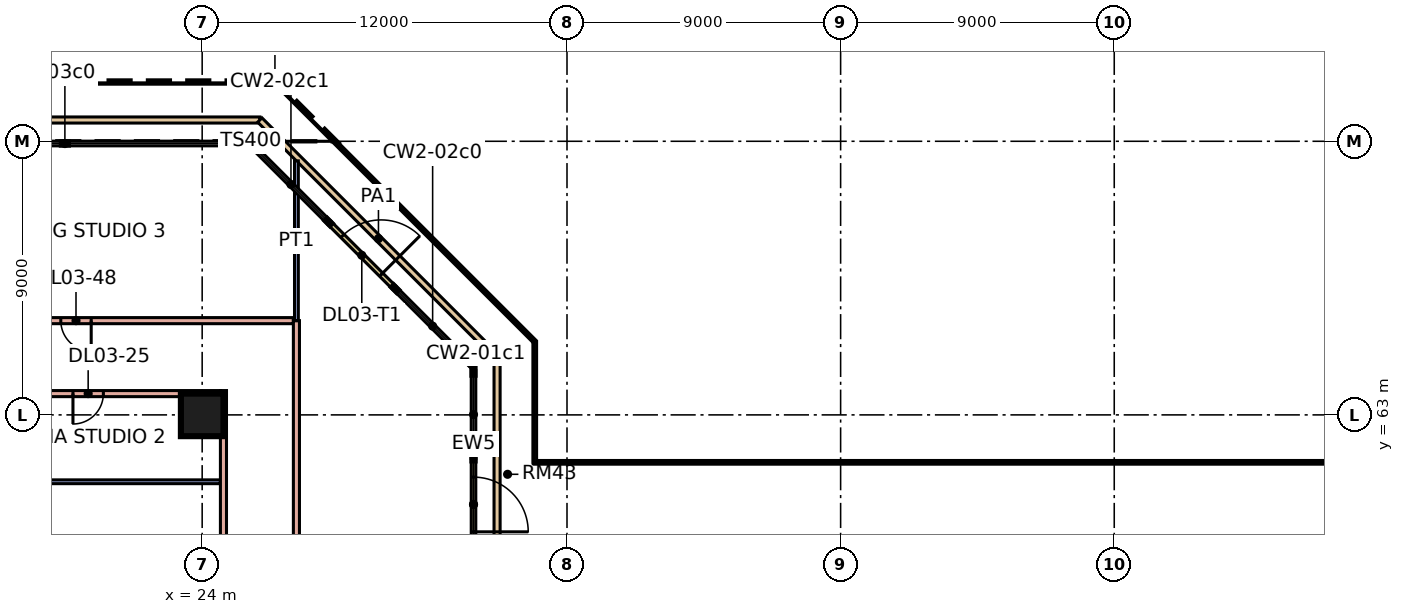
"""IFC4 building model, lengths in metres.
Left out: names, types, materials, properties, quantities, classifications, styles, units other than length and angle.
Written with IfcOpenShell. Run it as: python <this file> out.ifc"""

import sys

from ifc_helpers import new_model, si_unit, direction, frame, frame_2d, origin, origin_2d, place, context, subcontext, project, spatial, rectangle, extrude, element, fill, save


model = new_model("IFC4")
c1 = context("Model", 3, precision=1e-05, world=origin(), true_north=direction((0.0, 1.0)))
c2 = subcontext(c1, "Body", "Model", "MODEL_VIEW")
j1 = project(units=[si_unit("LENGTHUNIT", "METRE"), si_unit("PLANEANGLEUNIT", "RADIAN")], contexts=[c1])
p1 = place(None, origin())
s1 = spatial("IfcSite", under=j1, at=p1, CompositionType="ELEMENT")
p2 = place(p1, origin())
s2 = spatial("IfcBuilding", under=s1, at=p2, CompositionType="ELEMENT")
p3 = place(p2, frame((0.0, 0.0, 16.8)))
s3 = spatial("IfcBuildingStorey", under=s2, at=p3, CompositionType="ELEMENT", Elevation=16.8)
p4 = place(p3, frame((24.0, 63.0, 0.0), z_axis=(0.0, 0.0, 1.0), x_axis=(1.0, 0.0, 0.0)))
e1 = element("IfcColumn", 1, at=p4, inside=s3, PredefinedType="COLUMN", context=c2, shape_type="SweptSolid", body=[
    extrude(rectangle(XDim=1.4, YDim=1.4, at=origin_2d()), origin(), (0.0, 0.0, 1.0), 4.8),
])
p5 = place(p3, frame((32.925, 58.553, 0.0), z_axis=(0.0, 0.0, 1.0), x_axis=(0.0, 1.0, 0.0)))
e2 = element("IfcWall", 2, at=p5, inside=s3, PredefinedType="SOLIDWALL", context=c2, shape_type="SweptSolid", body=[
    extrude(rectangle(XDim=3.0, YDim=0.15, at=frame_2d((1.5, 0.0))), origin(), (0.0, 0.0, 1.0), 4.4),
])
p6 = place(p5, frame((0.6, 0.0, 0.0)))
e3 = element("IfcOpeningElement", 3, at=p6, cuts=e2, PredefinedType="OPENING", context=c2, shape_type="SweptSolid", body=[
    extrude(rectangle(XDim=1.8, YDim=2.4, at=frame_2d((0.9, 1.2))), frame((0.0, 0.085, 0.0), z_axis=(0.0, -1.0, 0.0), x_axis=(1.0, 0.0, 0.0)), (0.0, 0.0, 1.0), 0.17),
])
p7 = place(p3, frame((30.311, 67.19, 0.0), z_axis=(0.0, 0.0, 1.0), x_axis=(-0.707106781187, 0.707106781187, 0.0)))
e4 = element("IfcWall", 4, at=p7, inside=s3, PredefinedType="SOLIDWALL", context=c2, shape_type="SweptSolid", body=[
    extrude(rectangle(XDim=3.0, YDim=0.15, at=frame_2d((1.5, 0.0))), origin(), (0.0, 0.0, 1.0), 4.4),
])
p8 = place(p7, frame((0.6, 0.0, 0.0)))
e5 = element("IfcOpeningElement", 5, at=p8, cuts=e4, PredefinedType="OPENING", context=c2, shape_type="SweptSolid", body=[
    extrude(rectangle(XDim=1.8, YDim=2.4, at=frame_2d((0.9, 1.2))), frame((0.0, 0.085, 0.0), z_axis=(0.0, -1.0, 0.0), x_axis=(1.0, 0.0, 0.0)), (0.0, 0.0, 1.0), 0.17),
])
p9 = place(p3, frame((-1.896, 72.7, 0.0), z_axis=(0.0, 0.0, 1.0), x_axis=(1.0, 0.0, 0.0)))
e6 = element("IfcWall", 6, at=p9, inside=s3, PredefinedType="PARAPET", context=c2, shape_type="SweptSolid", body=[
    extrude(rectangle(XDim=27.793, YDim=0.2, at=frame_2d((13.896, 0.0))), origin(), (0.0, 0.0, 1.0), 0.5),
])
p10 = place(p3, frame((25.896, 72.7, 0.0), z_axis=(0.0, 0.0, 1.0), x_axis=(0.707106781187, -0.707106781187, 0.0)))
e7 = element("IfcWall", 7, at=p10, inside=s3, PredefinedType="PARAPET", context=c2, shape_type="SweptSolid", body=[
    extrude(rectangle(XDim=11.036, YDim=0.2, at=frame_2d((5.518, 0.0))), origin(), (0.0, 0.0, 1.0), 0.5),
])
p11 = place(p3, frame((33.7, 64.896, 0.0), z_axis=(0.0, 0.0, 1.0), x_axis=(0.0, -1.0, 0.0)))
e8 = element("IfcWall", 8, at=p11, inside=s3, PredefinedType="PARAPET", context=c2, shape_type="SweptSolid", body=[
    extrude(rectangle(XDim=8.697, YDim=0.2, at=frame_2d((4.348, 0.0))), origin(), (0.0, 0.0, 1.0), 0.5),
])
p12 = place(p3, frame((-3.0, 66.1, 0.0), z_axis=(0.0, 0.0, 1.0), x_axis=(1.0, 0.0, 0.0)))
e9 = element("IfcWall", 9, at=p12, inside=s3, PredefinedType="PARTITIONING", context=c2, shape_type="SweptSolid", body=[
    extrude(rectangle(XDim=30.0, YDim=0.2, at=frame_2d((15.0, 0.0))), origin(), (0.0, 0.0, 1.0), 4.4),
])
p13 = place(p12, frame((8.6, 0.0, 0.0)))
e10 = element("IfcOpeningElement", 10, at=p13, cuts=e9, PredefinedType="OPENING", context=c2, shape_type="SweptSolid", body=[
    extrude(rectangle(XDim=1.0, YDim=2.1, at=frame_2d((0.5, 1.05))), frame((0.0, 0.11, 0.0), z_axis=(0.0, -1.0, 0.0), x_axis=(1.0, 0.0, 0.0)), (0.0, 0.0, 1.0), 0.22),
])
p14 = place(p12, frame((22.35, 0.0, 0.0)))
e11 = element("IfcOpeningElement", 11, at=p14, cuts=e9, PredefinedType="OPENING", context=c2, shape_type="SweptSolid", body=[
    extrude(rectangle(XDim=1.0, YDim=2.1, at=frame_2d((0.5, 1.05))), frame((0.0, 0.11, 0.0), z_axis=(0.0, -1.0, 0.0), x_axis=(1.0, 0.0, 0.0)), (0.0, 0.0, 1.0), 0.22),
])
p15 = place(p3, frame((15.7, 60.8, 0.0), z_axis=(0.0, 0.0, 1.0), x_axis=(1.0, 0.0, 0.0)))
e12 = element("IfcWall", 12, at=p15, inside=s3, PredefinedType="PARTITIONING", context=c2, shape_type="SweptSolid", body=[
    extrude(rectangle(XDim=8.9, YDim=0.125, at=frame_2d((4.45, 0.0))), origin(), (0.0, 0.0, 1.0), 4.4),
])
p16 = place(p3, frame((15.7, 63.7, 0.0), z_axis=(0.0, 0.0, 1.0), x_axis=(1.0, 0.0, 0.0)))
e13 = element("IfcWall", 13, at=p16, inside=s3, PredefinedType="PARTITIONING", context=c2, shape_type="SweptSolid", body=[
    extrude(rectangle(XDim=8.9, YDim=0.2, at=frame_2d((4.45, 0.0))), origin(), (0.0, 0.0, 1.0), 4.4),
])
p17 = place(p16, frame((4.05, 0.0, 0.0)))
e14 = element("IfcOpeningElement", 14, at=p17, cuts=e13, PredefinedType="OPENING", context=c2, shape_type="SweptSolid", body=[
    extrude(rectangle(XDim=1.0, YDim=2.1, at=frame_2d((0.5, 1.05))), frame((0.0, 0.11, 0.0), z_axis=(0.0, -1.0, 0.0), x_axis=(1.0, 0.0, 0.0)), (0.0, 0.0, 1.0), 0.22),
])
p18 = place(p3, frame((24.7, 44.3, 0.0), z_axis=(0.0, 0.0, 1.0), x_axis=(0.0, 1.0, 0.0)))
e15 = element("IfcWall", 15, at=p18, inside=s3, PredefinedType="PARTITIONING", context=c2, shape_type="SweptSolid", body=[
    extrude(rectangle(XDim=19.5, YDim=0.2, at=frame_2d((9.75, 0.0))), origin(), (0.0, 0.0, 1.0), 4.4),
])
p19 = place(p18, frame((1.45, 0.0, 0.0)))
e16 = element("IfcOpeningElement", 16, at=p19, cuts=e15, PredefinedType="OPENING", context=c2, shape_type="SweptSolid", body=[
    extrude(rectangle(XDim=1.0, YDim=2.1, at=frame_2d((0.5, 1.05))), frame((0.0, 0.11, 0.0), z_axis=(0.0, -1.0, 0.0), x_axis=(1.0, 0.0, 0.0)), (0.0, 0.0, 1.0), 0.22),
])
p20 = place(p18, frame((6.65, 0.0, 0.0)))
e17 = element("IfcOpeningElement", 17, at=p20, cuts=e15, PredefinedType="OPENING", context=c2, shape_type="SweptSolid", body=[
    extrude(rectangle(XDim=1.0, YDim=2.1, at=frame_2d((0.5, 1.05))), frame((0.0, 0.11, 0.0), z_axis=(0.0, -1.0, 0.0), x_axis=(1.0, 0.0, 0.0)), (0.0, 0.0, 1.0), 0.22),
])
p21 = place(p3, frame((27.1, 38.5, 0.0), z_axis=(0.0, 0.0, 1.0), x_axis=(0.0, 1.0, 0.0)))
e18 = element("IfcWall", 18, at=p21, inside=s3, PredefinedType="PARTITIONING", context=c2, shape_type="SweptSolid", body=[
    extrude(rectangle(XDim=27.6, YDim=0.2, at=frame_2d((13.8, 0.0))), origin(), (0.0, 0.0, 1.0), 4.4),
])
p22 = place(p21, frame((13.05, 0.0, 0.0)))
e19 = element("IfcOpeningElement", 19, at=p22, cuts=e18, PredefinedType="OPENING", context=c2, shape_type="SweptSolid", body=[
    extrude(rectangle(XDim=1.8, YDim=2.1, at=frame_2d((0.9, 1.05))), frame((0.0, 0.11, 0.0), z_axis=(0.0, -1.0, 0.0), x_axis=(1.0, 0.0, 0.0)), (0.0, 0.0, 1.0), 0.22),
])
p23 = place(p21, frame((3.05, 0.0, 0.0)))
e20 = element("IfcOpeningElement", 20, at=p23, cuts=e18, PredefinedType="OPENING", context=c2, shape_type="SweptSolid", body=[
    extrude(rectangle(XDim=1.8, YDim=2.1, at=frame_2d((0.9, 1.05))), frame((0.0, 0.11, 0.0), z_axis=(0.0, -1.0, 0.0), x_axis=(1.0, 0.0, 0.0)), (0.0, 0.0, 1.0), 0.22),
])
p24 = place(p3, frame((27.1, 66.1, 0.0), z_axis=(0.0, 0.0, 1.0), x_axis=(0.0, 1.0, 0.0)))
e21 = element("IfcWall", 21, at=p24, inside=s3, PredefinedType="PARTITIONING", context=c2, shape_type="SweptSolid", body=[
    extrude(rectangle(XDim=5.255, YDim=0.125, at=frame_2d((2.627, 0.0))), origin(), (0.0, 0.0, 1.0), 4.4),
])
p25 = place(p6, frame((1.8, 0.0, 0.0), z_axis=(0.0, 0.0, 1.0), x_axis=(-1.0, 0.0, 0.0)))
e22 = element("IfcDoor", 22, at=p25, inside=s3, OperationType="DOUBLE_DOOR_SINGLE_SWING", PredefinedType="DOOR", context=c2, shape_type="SweptSolid", body=[
    extrude(rectangle(XDim=1.8, YDim=2.4, at=frame_2d((0.9, 1.2))), frame((0.0, 0.025, 0.0), z_axis=(0.0, -1.0, 0.0), x_axis=(1.0, 0.0, 0.0)), (0.0, 0.0, 1.0), 0.05),
])
fill(e3, e22)
p26 = place(p8, frame((1.8, 0.0, 0.0), z_axis=(0.0, 0.0, 1.0), x_axis=(-1.0, 0.0, 0.0)))
e23 = element("IfcDoor", 23, at=p26, inside=s3, OperationType="DOUBLE_DOOR_SINGLE_SWING", PredefinedType="DOOR", context=c2, shape_type="SweptSolid", body=[
    extrude(rectangle(XDim=1.8, YDim=2.4, at=frame_2d((0.9, 1.2))), frame((0.0, 0.025, 0.0), z_axis=(0.0, -1.0, 0.0), x_axis=(1.0, 0.0, 0.0)), (0.0, 0.0, 1.0), 0.05),
])
fill(e5, e23)
p27 = place(p17, frame((1.0, 0.0, 0.0), z_axis=(0.0, 0.0, 1.0), x_axis=(-1.0, 0.0, 0.0)))
e24 = element("IfcDoor", 24, at=p27, inside=s3, OperationType="SINGLE_SWING_LEFT", PredefinedType="DOOR", context=c2, shape_type="SweptSolid", body=[
    extrude(rectangle(XDim=1.0, YDim=2.1, at=frame_2d((0.5, 1.05))), frame((0.0, 0.025, 0.0), z_axis=(0.0, -1.0, 0.0), x_axis=(1.0, 0.0, 0.0)), (0.0, 0.0, 1.0), 0.05),
])
fill(e14, e24)
p28 = place(p14, origin())
e25 = element("IfcDoor", 25, at=p28, inside=s3, OperationType="SINGLE_SWING_RIGHT", PredefinedType="DOOR", context=c2, shape_type="SweptSolid", body=[
    extrude(rectangle(XDim=1.0, YDim=2.1, at=frame_2d((0.5, 1.05))), frame((0.0, 0.025, 0.0), z_axis=(0.0, -1.0, 0.0), x_axis=(1.0, 0.0, 0.0)), (0.0, 0.0, 1.0), 0.05),
])
fill(e11, e25)
save(model, sys.argv[1])
